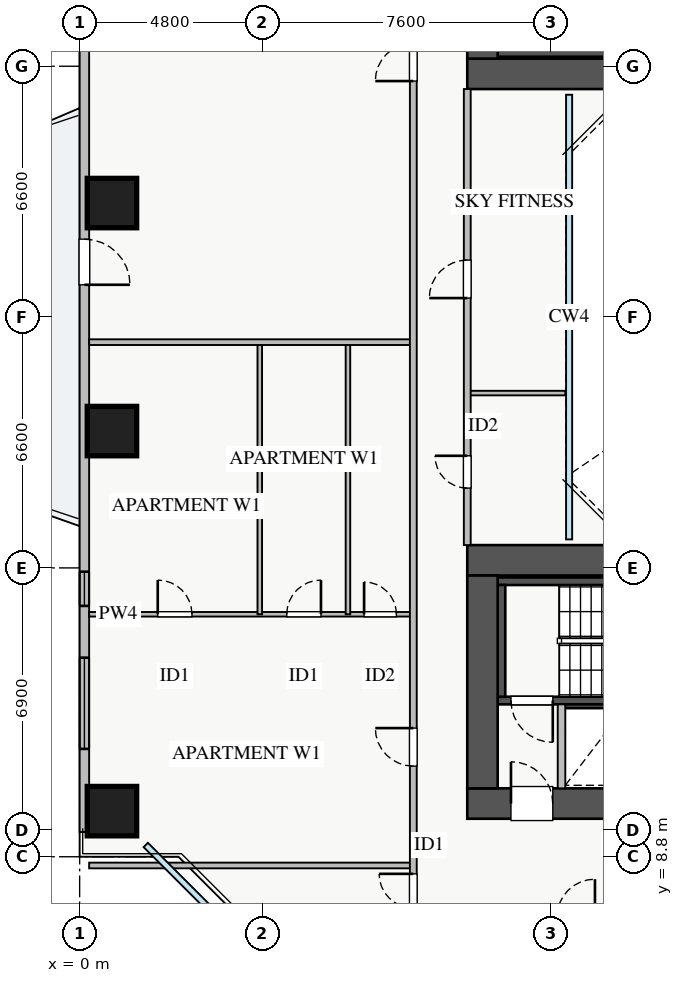
"""IFC4 building model, lengths in metres.
Left out: names, types, materials, properties, quantities, classifications, styles, units other than length and angle.
Written with IfcOpenShell. Run it as: python <this file> out.ifc"""

import sys

from ifc_helpers import new_model, si_unit, direction, frame, frame_2d, origin, origin_2d, place, context, subcontext, project, spatial, rectangle, extrude, source, transform, mapped, element, fill, save


model = new_model("IFC4")
c1 = context("Model", 3, precision=1e-05, world=origin(), true_north=direction((0.0, 1.0)))
c2 = subcontext(c1, "Body", "Model", "MODEL_VIEW")
j1 = project(units=[si_unit("LENGTHUNIT", "METRE"), si_unit("PLANEANGLEUNIT", "RADIAN")], contexts=[c1])
p1 = place(None, origin())
s1 = spatial("IfcSite", under=j1, at=p1, CompositionType="ELEMENT")
p2 = place(p1, origin())
s2 = spatial("IfcBuilding", under=s1, at=p2, CompositionType="ELEMENT")
p3 = place(p2, frame((0.0, 0.0, 29.5)))
s3 = spatial("IfcBuildingStorey", under=s2, at=p3, CompositionType="ELEMENT", Elevation=29.5)
p4 = place(p3, frame((12.68, 12.8, 0.0), z_axis=(0.0, 0.0, 1.0), x_axis=(1.0, 0.0, 0.0)))
e1 = element("IfcWall", 1, at=p4, inside=s3, PredefinedType="SHEAR", context=c2, shape_type="SweptSolid", body=[
    extrude(rectangle(XDim=1.94, YDim=0.18, at=frame_2d((0.97, 0.0))), origin(), (0.0, 0.0, 1.0), 3.07),
])
p5 = place(p3, frame((11.0, 29.95, 0.0), z_axis=(0.0, 0.0, 1.0), x_axis=(1.0, 0.0, 0.0)))
e2 = element("IfcWall", 2, at=p5, inside=s3, PredefinedType="SHEAR", context=c2, shape_type="SweptSolid", body=[
    extrude(rectangle(XDim=7.15, YDim=0.2, at=frame_2d((3.575, 0.0))), origin(), (0.0, 0.0, 1.0), 3.25),
])
p6 = place(p3, frame((11.0, 12.91, 0.0), z_axis=(0.0, 0.0, 1.0), x_axis=(1.0, 0.0, 0.0)))
e3 = element("IfcWall", 3, at=p6, inside=s3, PredefinedType="SHEAR", context=c2, shape_type="SweptSolid", body=[
    extrude(rectangle(XDim=7.15, YDim=0.2, at=frame_2d((3.575, 0.0))), origin(), (0.0, 0.0, 1.0), 3.25),
])
p7 = place(p6, frame((0.35, 0.0, 0.0)))
e4 = element("IfcOpeningElement", 4, at=p7, cuts=e3, PredefinedType="OPENING", context=c2, shape_type="SweptSolid", body=[
    extrude(rectangle(XDim=1.1, YDim=2.05, at=frame_2d((0.55, 1.025))), frame((0.0, 0.11, 0.0), z_axis=(0.0, -1.0, 0.0), x_axis=(1.0, 0.0, 0.0)), (0.0, 0.0, 1.0), 0.22),
])
p8 = place(p3, frame((11.0, 16.05, 0.0), z_axis=(0.0, 0.0, 1.0), x_axis=(1.0, 0.0, 0.0)))
e5 = element("IfcWall", 5, at=p8, inside=s3, PredefinedType="SHEAR", context=c2, shape_type="SweptSolid", body=[
    extrude(rectangle(XDim=7.15, YDim=0.2, at=frame_2d((3.575, 0.0))), origin(), (0.0, 0.0, 1.0), 3.25),
])
p9 = place(p3, frame((11.1, 13.01, 0.0), z_axis=(0.0, 0.0, 1.0), x_axis=(0.0, 1.0, 0.0)))
e6 = element("IfcWall", 6, at=p9, inside=s3, PredefinedType="SHEAR", context=c2, shape_type="SweptSolid", body=[
    extrude(rectangle(XDim=2.94, YDim=0.2, at=frame_2d((1.47, 0.0))), origin(), (0.0, 0.0, 1.0), 3.25),
])
p10 = place(p3, frame((10.2, 29.4, 0.0), z_axis=(0.0, 0.0, 1.0), x_axis=(1.0, 0.0, 0.0)))
e7 = element("IfcWall", 7, at=p10, inside=s3, PredefinedType="SHEAR", context=c2, shape_type="SweptSolid", body=[
    extrude(rectangle(XDim=17.6, YDim=0.8, at=frame_2d((8.8, 0.0))), origin(), (0.0, 0.0, 1.0), 3.25),
])
p11 = place(p3, frame((10.6, 29.8, 0.0), z_axis=(0.0, 0.0, 1.0), x_axis=(0.0, 1.0, 0.0)))
e8 = element("IfcWall", 8, at=p11, inside=s3, PredefinedType="SHEAR", context=c2, shape_type="SweptSolid", body=[
    extrude(rectangle(XDim=5.6, YDim=0.8, at=frame_2d((2.8, 0.0))), origin(), (0.0, 0.0, 1.0), 3.25),
])
p12 = place(p3, frame((10.2, 10.2, 0.0), z_axis=(0.0, 0.0, 1.0), x_axis=(1.0, 0.0, 0.0)))
e9 = element("IfcWall", 9, at=p12, inside=s3, PredefinedType="SHEAR", context=c2, shape_type="SweptSolid", body=[
    extrude(rectangle(XDim=17.6, YDim=0.8, at=frame_2d((8.8, 0.0))), origin(), (0.0, 0.0, 1.0), 3.25),
])
p13 = place(p12, frame((1.15, 0.0, 0.0)))
e10 = element("IfcOpeningElement", 10, at=p13, cuts=e9, PredefinedType="OPENING", context=c2, shape_type="SweptSolid", body=[
    extrude(rectangle(XDim=1.1, YDim=2.05, at=frame_2d((0.55, 1.025))), frame((0.0, 0.41, 0.0), z_axis=(0.0, -1.0, 0.0), x_axis=(1.0, 0.0, 0.0)), (0.0, 0.0, 1.0), 0.82),
])
p14 = place(p12, frame((8.3, 0.0, 0.0)))
e11 = element("IfcOpeningElement", 11, at=p14, cuts=e9, PredefinedType="OPENING", context=c2, shape_type="SweptSolid", body=[
    extrude(rectangle(XDim=1.1, YDim=2.05, at=frame_2d((0.55, 1.025))), frame((0.0, 0.41, 0.0), z_axis=(0.0, -1.0, 0.0), x_axis=(1.0, 0.0, 0.0)), (0.0, 0.0, 1.0), 0.82),
])
p15 = place(p12, frame((10.05, 0.0, 0.0)))
e12 = element("IfcOpeningElement", 12, at=p15, cuts=e9, PredefinedType="OPENING", context=c2, shape_type="SweptSolid", body=[
    extrude(rectangle(XDim=1.1, YDim=2.05, at=frame_2d((0.55, 1.025))), frame((0.0, 0.41, 0.0), z_axis=(0.0, -1.0, 0.0), x_axis=(1.0, 0.0, 0.0)), (0.0, 0.0, 1.0), 0.82),
])
p16 = place(p12, frame((14.74, 0.0, 0.0)))
e13 = element("IfcOpeningElement", 13, at=p16, cuts=e9, PredefinedType="OPENING", context=c2, shape_type="SweptSolid", body=[
    extrude(rectangle(XDim=1.0, YDim=2.05, at=frame_2d((0.5, 1.025))), frame((0.0, 0.41, 0.0), z_axis=(0.0, -1.0, 0.0), x_axis=(1.0, 0.0, 0.0)), (0.0, 0.0, 1.0), 0.82),
])
p17 = place(p12, frame((12.585, 0.0, 0.0)))
e14 = element("IfcOpeningElement", 14, at=p17, cuts=e9, PredefinedType="OPENING", context=c2, shape_type="SweptSolid", body=[
    extrude(rectangle(XDim=1.0, YDim=2.05, at=frame_2d((0.5, 1.025))), frame((0.0, 0.41, 0.0), z_axis=(0.0, -1.0, 0.0), x_axis=(1.0, 0.0, 0.0)), (0.0, 0.0, 1.0), 0.82),
])
p18 = place(p3, frame((10.2, 16.6, 0.0), z_axis=(0.0, 0.0, 1.0), x_axis=(1.0, 0.0, 0.0)))
e15 = element("IfcWall", 15, at=p18, inside=s3, PredefinedType="SHEAR", context=c2, shape_type="SweptSolid", body=[
    extrude(rectangle(XDim=17.6, YDim=0.8, at=frame_2d((8.8, 0.0))), origin(), (0.0, 0.0, 1.0), 3.25),
])
p19 = place(p3, frame((10.6, 10.6, 0.0), z_axis=(0.0, 0.0, 1.0), x_axis=(0.0, 1.0, 0.0)))
e16 = element("IfcWall", 16, at=p19, inside=s3, PredefinedType="SHEAR", context=c2, shape_type="SweptSolid", body=[
    extrude(rectangle(XDim=5.6, YDim=0.8, at=frame_2d((2.8, 0.0))), origin(), (0.0, 0.0, 1.0), 3.25),
])
m1 = source(origin(), c2, "Body", "SweptSolid", [
    extrude(rectangle(XDim=1.3, YDim=1.3, at=origin_2d()), origin(), (0.0, 0.0, 1.0), 3.25),
])
for number, where, z_axis, x_axis in (
    (17, (0.85, 26.0, 0.0), (0.0, 0.0, 1.0), (1.0, 0.0, 0.0)),
    (18, (0.85, 20.0, 0.0), (0.0, 0.0, 1.0), (1.0, 0.0, 0.0)),
    (19, (0.85, 10.0, 0.0), (0.0, 0.0, 1.0), (1.0, 0.0, 0.0)),
):
    element("IfcColumn", number, at=place(p3, frame(where, z_axis=z_axis, x_axis=x_axis)), inside=s3, PredefinedType="COLUMN", context=c2, shape_type="MappedRepresentation", body=[
        mapped(m1, transform((0.0, 0.0, 0.0), x_axis=(1.0, 0.0, 0.0), y_axis=(0.0, 1.0, 0.0), z_axis=(0.0, 0.0, 1.0), scale=1.0)),
    ])
p20 = place(p3, frame((0.125, 9.45, 0.0), z_axis=(0.0, 0.0, 1.0), x_axis=(0.0, 1.0, 0.0)))
e20 = element("IfcWall", 20, at=p20, inside=s3, PredefinedType="STANDARD", context=c2, shape_type="SweptSolid", body=[
    extrude(rectangle(XDim=27.1, YDim=0.25, at=frame_2d((13.55, 0.0))), origin(), (0.0, 0.0, 1.0), 2.61),
])
p21 = place(p20, frame((14.4, 0.0, 0.0)))
e21 = element("IfcOpeningElement", 21, at=p21, cuts=e20, PredefinedType="OPENING", context=c2, shape_type="SweptSolid", body=[
    extrude(rectangle(XDim=1.2, YDim=2.1, at=frame_2d((0.6, 1.05))), frame((0.0, 0.135, 0.0), z_axis=(0.0, -1.0, 0.0), x_axis=(1.0, 0.0, 0.0)), (0.0, 0.0, 1.0), 0.27),
])
p22 = place(p20, frame((2.188, 0.0, 0.9)))
e22 = element("IfcOpeningElement", 22, at=p22, cuts=e20, PredefinedType="OPENING", context=c2, shape_type="SweptSolid", body=[
    extrude(rectangle(XDim=2.4, YDim=1.48, at=frame_2d((1.2, 0.74))), frame((0.0, 0.135, 0.0), z_axis=(0.0, -1.0, 0.0), x_axis=(1.0, 0.0, 0.0)), (0.0, 0.0, 1.0), 0.27),
])
p23 = place(p20, frame((22.663, 0.0, 0.9)))
e23 = element("IfcOpeningElement", 23, at=p23, cuts=e20, PredefinedType="OPENING", context=c2, shape_type="SweptSolid", body=[
    extrude(rectangle(XDim=2.1, YDim=1.48, at=frame_2d((1.05, 0.74))), frame((0.0, 0.135, 0.0), z_axis=(0.0, -1.0, 0.0), x_axis=(1.0, 0.0, 0.0)), (0.0, 0.0, 1.0), 0.27),
])
p24 = place(p20, frame((5.95, 0.0, 0.9)))
e24 = element("IfcOpeningElement", 24, at=p24, cuts=e20, PredefinedType="OPENING", context=c2, shape_type="SweptSolid", body=[
    extrude(rectangle(XDim=0.9, YDim=1.2, at=frame_2d((0.45, 0.6))), frame((0.0, 0.135, 0.0), z_axis=(0.0, -1.0, 0.0), x_axis=(1.0, 0.0, 0.0)), (0.0, 0.0, 1.0), 0.27),
])
p25 = place(p3, frame((12.68, 10.6, 0.0), z_axis=(0.0, 0.0, 1.0), x_axis=(0.0, 1.0, 0.0)))
e25 = element("IfcWall", 25, at=p25, inside=s3, PredefinedType="PARTITIONING", context=c2, shape_type="SweptSolid", body=[
    extrude(rectangle(XDim=2.21, YDim=0.2, at=frame_2d((1.105, 0.0))), origin(), (0.0, 0.0, 1.0), 3.07),
])
p26 = place(p3, frame((0.25, 8.57, 0.0), z_axis=(0.0, 0.0, 1.0), x_axis=(1.0, 0.0, 0.0)))
e26 = element("IfcWall", 26, at=p26, inside=s3, PredefinedType="PARTITIONING", context=c2, shape_type="SweptSolid", body=[
    extrude(rectangle(XDim=8.53, YDim=0.15, at=frame_2d((4.265, 0.0))), origin(), (0.0, 0.0, 1.0), 3.07),
])
p27 = place(p3, frame((0.25, 15.18, 0.0), z_axis=(0.0, 0.0, 1.0), x_axis=(1.0, 0.0, 0.0)))
e27 = element("IfcWall", 27, at=p27, inside=s3, PredefinedType="PLUMBINGWALL", context=c2, shape_type="SweptSolid", body=[
    extrude(rectangle(XDim=8.53, YDim=0.12, at=frame_2d((4.265, 0.0))), origin(), (0.0, 0.0, 1.0), 3.07),
])
p28 = place(p27, frame((1.805, 0.0, 0.0)))
e28 = element("IfcOpeningElement", 28, at=p28, cuts=e27, PredefinedType="OPENING", context=c2, shape_type="SweptSolid", body=[
    extrude(rectangle(XDim=0.9, YDim=2.05, at=frame_2d((0.45, 1.025))), frame((0.0, 0.07, 0.0), z_axis=(0.0, -1.0, 0.0), x_axis=(1.0, 0.0, 0.0)), (0.0, 0.0, 1.0), 0.14),
])
p29 = place(p27, frame((5.2, 0.0, 0.0)))
e29 = element("IfcOpeningElement", 29, at=p29, cuts=e27, PredefinedType="OPENING", context=c2, shape_type="SweptSolid", body=[
    extrude(rectangle(XDim=0.9, YDim=2.05, at=frame_2d((0.45, 1.025))), frame((0.0, 0.07, 0.0), z_axis=(0.0, -1.0, 0.0), x_axis=(1.0, 0.0, 0.0)), (0.0, 0.0, 1.0), 0.14),
])
p30 = place(p27, frame((7.235, 0.0, 0.0)))
e30 = element("IfcOpeningElement", 30, at=p30, cuts=e27, PredefinedType="OPENING", context=c2, shape_type="SweptSolid", body=[
    extrude(rectangle(XDim=0.85, YDim=2.05, at=frame_2d((0.425, 1.025))), frame((0.0, 0.07, 0.0), z_axis=(0.0, -1.0, 0.0), x_axis=(1.0, 0.0, 0.0)), (0.0, 0.0, 1.0), 0.14),
])
for number, where, z_axis, x_axis in (
    (31, (4.74, 15.18, 0.0), (0.0, 0.0, 1.0), (0.0, 1.0, 0.0)),
    (32, (7.06, 15.18, 0.0), (0.0, 0.0, 1.0), (0.0, 1.0, 0.0)),
):
    element("IfcWall", number, at=place(p3, frame(where, z_axis=z_axis, x_axis=x_axis)), inside=s3, PredefinedType="PLUMBINGWALL", context=c2, shape_type="SweptSolid", body=[
        extrude(rectangle(XDim=7.16, YDim=0.12, at=frame_2d((3.58, 0.0))), origin(), (0.0, 0.0, 1.0), 3.07),
    ])
p31 = place(p3, frame((0.25, 22.34, 0.0), z_axis=(0.0, 0.0, 1.0), x_axis=(1.0, 0.0, 0.0)))
e33 = element("IfcWall", 33, at=p31, inside=s3, PredefinedType="PARTITIONING", context=c2, shape_type="SweptSolid", body=[
    extrude(rectangle(XDim=8.53, YDim=0.15, at=frame_2d((4.265, 0.0))), origin(), (0.0, 0.0, 1.0), 3.07),
])
p32 = place(p3, frame((8.78, 7.21, 0.0), z_axis=(0.0, 0.0, 1.0), x_axis=(0.0, 1.0, 0.0)))
e34 = element("IfcWall", 34, at=p32, inside=s3, PredefinedType="PARTITIONING", context=c2, shape_type="SweptSolid", body=[
    extrude(rectangle(XDim=31.23, YDim=0.18, at=frame_2d((15.615, 0.0))), origin(), (0.0, 0.0, 1.0), 3.07),
])
p33 = place(p32, frame((30.09, 0.0, 0.0)))
e35 = element("IfcOpeningElement", 35, at=p33, cuts=e34, PredefinedType="OPENING", context=c2, shape_type="SweptSolid", body=[
    extrude(rectangle(XDim=0.9, YDim=2.05, at=frame_2d((0.45, 1.025))), frame((0.0, 0.1, 0.0), z_axis=(0.0, -1.0, 0.0), x_axis=(1.0, 0.0, 0.0)), (0.0, 0.0, 1.0), 0.2),
])
p34 = place(p32, frame((0.24, 0.0, 0.0)))
e36 = element("IfcOpeningElement", 36, at=p34, cuts=e34, PredefinedType="OPENING", context=c2, shape_type="SweptSolid", body=[
    extrude(rectangle(XDim=0.9, YDim=2.05, at=frame_2d((0.45, 1.025))), frame((0.0, 0.1, 0.0), z_axis=(0.0, -1.0, 0.0), x_axis=(1.0, 0.0, 0.0)), (0.0, 0.0, 1.0), 0.2),
])
p35 = place(p32, frame((3.975, 0.0, 0.0)))
e37 = element("IfcOpeningElement", 37, at=p35, cuts=e34, PredefinedType="OPENING", context=c2, shape_type="SweptSolid", body=[
    extrude(rectangle(XDim=1.0, YDim=2.05, at=frame_2d((0.5, 1.025))), frame((0.0, 0.1, 0.0), z_axis=(0.0, -1.0, 0.0), x_axis=(1.0, 0.0, 0.0)), (0.0, 0.0, 1.0), 0.2),
])
p36 = place(p32, frame((22.0, 0.0, 0.0)))
e38 = element("IfcOpeningElement", 38, at=p36, cuts=e34, PredefinedType="OPENING", context=c2, shape_type="SweptSolid", body=[
    extrude(rectangle(XDim=1.0, YDim=2.05, at=frame_2d((0.5, 1.025))), frame((0.0, 0.1, 0.0), z_axis=(0.0, -1.0, 0.0), x_axis=(1.0, 0.0, 0.0)), (0.0, 0.0, 1.0), 0.2),
])
p37 = place(p3, frame((10.2, 21.0, 0.0), z_axis=(0.0, 0.0, 1.0), x_axis=(1.0, 0.0, 0.0)))
e39 = element("IfcWall", 39, at=p37, inside=s3, PredefinedType="PLUMBINGWALL", context=c2, shape_type="SweptSolid", body=[
    extrude(rectangle(XDim=2.58, YDim=0.12, at=frame_2d((1.29, 0.0))), origin(), (0.0, 0.0, 1.0), 3.07),
])
p38 = place(p3, frame((10.2, 17.0, 0.0), z_axis=(0.0, 0.0, 1.0), x_axis=(0.0, 1.0, 0.0)))
e40 = element("IfcWall", 40, at=p38, inside=s3, PredefinedType="PARTITIONING", context=c2, shape_type="SweptSolid", body=[
    extrude(rectangle(XDim=12.0, YDim=0.18, at=frame_2d((6.0, 0.0))), origin(), (0.0, 0.0, 1.0), 3.07),
])
p39 = place(p38, frame((1.5, 0.0, 0.0)))
e41 = element("IfcOpeningElement", 41, at=p39, cuts=e40, PredefinedType="OPENING", context=c2, shape_type="SweptSolid", body=[
    extrude(rectangle(XDim=0.85, YDim=2.05, at=frame_2d((0.425, 1.025))), frame((0.0, 0.1, 0.0), z_axis=(0.0, -1.0, 0.0), x_axis=(1.0, 0.0, 0.0)), (0.0, 0.0, 1.0), 0.2),
])
p40 = place(p38, frame((6.5, 0.0, 0.0)))
e42 = element("IfcOpeningElement", 42, at=p40, cuts=e40, PredefinedType="OPENING", context=c2, shape_type="SweptSolid", body=[
    extrude(rectangle(XDim=1.0, YDim=2.05, at=frame_2d((0.5, 1.025))), frame((0.0, 0.1, 0.0), z_axis=(0.0, -1.0, 0.0), x_axis=(1.0, 0.0, 0.0)), (0.0, 0.0, 1.0), 0.2),
])
m2 = source(origin(), c2, "Body", "SweptSolid", [
    extrude(rectangle(XDim=1.2, YDim=2.1, at=frame_2d((0.6, 1.05))), frame((0.0, 0.025, 0.0), z_axis=(0.0, -1.0, 0.0), x_axis=(1.0, 0.0, 0.0)), (0.0, 0.0, 1.0), 0.05),
])
p41 = place(p21, frame((1.2, 0.0, 0.0), z_axis=(0.0, 0.0, 1.0), x_axis=(-1.0, 0.0, 0.0)))
e43 = element("IfcDoor", 43, at=p41, inside=s3, OperationType="SINGLE_SWING_LEFT", PredefinedType="DOOR", context=c2, shape_type="MappedRepresentation", body=[
    mapped(m2, transform((0.0, 0.0, 0.0), x_axis=(1.0, 0.0, 0.0), y_axis=(0.0, 1.0, 0.0), z_axis=(0.0, 0.0, 1.0), scale=1.0)),
])
fill(e21, e43)
m3 = source(origin(), c2, "Body", "SweptSolid", [
    extrude(rectangle(XDim=2.4, YDim=1.48, at=frame_2d((1.2, 0.74))), frame((0.0, 0.03, 0.0), z_axis=(0.0, -1.0, 0.0), x_axis=(1.0, 0.0, 0.0)), (0.0, 0.0, 1.0), 0.06),
])
p42 = place(p22, origin())
e44 = element("IfcWindow", 44, at=p42, inside=s3, PartitioningType="TRIPLE_PANEL_VERTICAL", PredefinedType="WINDOW", context=c2, shape_type="MappedRepresentation", body=[
    mapped(m3, transform((0.0, 0.0, 0.0), x_axis=(1.0, 0.0, 0.0), y_axis=(0.0, 1.0, 0.0), z_axis=(0.0, 0.0, 1.0), scale=1.0)),
])
fill(e22, e44)
m4 = source(origin(), c2, "Body", "SweptSolid", [
    extrude(rectangle(XDim=1.1, YDim=2.05, at=frame_2d((0.55, 1.025))), frame((0.0, 0.025, 0.0), z_axis=(0.0, -1.0, 0.0), x_axis=(1.0, 0.0, 0.0)), (0.0, 0.0, 1.0), 0.05),
])
p43 = place(p13, origin())
e45 = element("IfcDoor", 45, at=p43, inside=s3, OperationType="SINGLE_SWING_LEFT", PredefinedType="DOOR", context=c2, shape_type="MappedRepresentation", body=[
    mapped(m4, transform((0.0, 0.0, 0.0), x_axis=(1.0, 0.0, 0.0), y_axis=(0.0, 1.0, 0.0), z_axis=(0.0, 0.0, 1.0), scale=1.0)),
])
fill(e10, e45)
p44 = place(p7, frame((1.1, 0.0, 0.0), z_axis=(0.0, 0.0, 1.0), x_axis=(-1.0, 0.0, 0.0)))
e46 = element("IfcDoor", 46, at=p44, inside=s3, OperationType="SINGLE_SWING_RIGHT", PredefinedType="DOOR", context=c2, shape_type="MappedRepresentation", body=[
    mapped(m4, transform((0.0, 0.0, 0.0), x_axis=(1.0, 0.0, 0.0), y_axis=(0.0, 1.0, 0.0), z_axis=(0.0, 0.0, 1.0), scale=1.0)),
])
fill(e4, e46)
m5 = source(origin(), c2, "Body", "SweptSolid", [
    extrude(rectangle(XDim=0.9, YDim=2.05, at=frame_2d((0.45, 1.025))), frame((0.0, 0.025, 0.0), z_axis=(0.0, -1.0, 0.0), x_axis=(1.0, 0.0, 0.0)), (0.0, 0.0, 1.0), 0.05),
])
p45 = place(p28, origin())
e47 = element("IfcDoor", 47, at=p45, inside=s3, OperationType="SINGLE_SWING_LEFT", PredefinedType="DOOR", context=c2, shape_type="MappedRepresentation", body=[
    mapped(m5, transform((0.0, 0.0, 0.0), x_axis=(1.0, 0.0, 0.0), y_axis=(0.0, 1.0, 0.0), z_axis=(0.0, 0.0, 1.0), scale=1.0)),
])
fill(e28, e47)
p46 = place(p29, origin())
e48 = element("IfcDoor", 48, at=p46, inside=s3, OperationType="SINGLE_SWING_RIGHT", PredefinedType="DOOR", context=c2, shape_type="MappedRepresentation", body=[
    mapped(m5, transform((0.0, 0.0, 0.0), x_axis=(1.0, 0.0, 0.0), y_axis=(0.0, 1.0, 0.0), z_axis=(0.0, 0.0, 1.0), scale=1.0)),
])
fill(e29, e48)
m6 = source(origin(), c2, "Body", "SweptSolid", [
    extrude(rectangle(XDim=0.85, YDim=2.05, at=frame_2d((0.425, 1.025))), frame((0.0, 0.025, 0.0), z_axis=(0.0, -1.0, 0.0), x_axis=(1.0, 0.0, 0.0)), (0.0, 0.0, 1.0), 0.05),
])
p47 = place(p30, origin())
e49 = element("IfcDoor", 49, at=p47, inside=s3, OperationType="SINGLE_SWING_LEFT", PredefinedType="DOOR", context=c2, shape_type="MappedRepresentation", body=[
    mapped(m6, transform((0.0, 0.0, 0.0), x_axis=(1.0, 0.0, 0.0), y_axis=(0.0, 1.0, 0.0), z_axis=(0.0, 0.0, 1.0), scale=1.0)),
])
fill(e30, e49)
p48 = place(p34, origin())
e50 = element("IfcDoor", 50, at=p48, inside=s3, OperationType="SINGLE_SWING_RIGHT", PredefinedType="DOOR", context=c2, shape_type="MappedRepresentation", body=[
    mapped(m5, transform((0.0, 0.0, 0.0), x_axis=(1.0, 0.0, 0.0), y_axis=(0.0, 1.0, 0.0), z_axis=(0.0, 0.0, 1.0), scale=1.0)),
])
fill(e36, e50)
m7 = source(origin(), c2, "Body", "SweptSolid", [
    extrude(rectangle(XDim=1.0, YDim=2.05, at=frame_2d((0.5, 1.025))), frame((0.0, 0.025, 0.0), z_axis=(0.0, -1.0, 0.0), x_axis=(1.0, 0.0, 0.0)), (0.0, 0.0, 1.0), 0.05),
])
p49 = place(p35, origin())
e51 = element("IfcDoor", 51, at=p49, inside=s3, OperationType="SINGLE_SWING_RIGHT", PredefinedType="DOOR", context=c2, shape_type="MappedRepresentation", body=[
    mapped(m7, transform((0.0, 0.0, 0.0), x_axis=(1.0, 0.0, 0.0), y_axis=(0.0, 1.0, 0.0), z_axis=(0.0, 0.0, 1.0), scale=1.0)),
])
fill(e37, e51)
p50 = place(p36, origin())
e52 = element("IfcDoor", 52, at=p50, inside=s3, OperationType="SINGLE_SWING_LEFT", PredefinedType="DOOR", context=c2, shape_type="MappedRepresentation", body=[
    mapped(m7, transform((0.0, 0.0, 0.0), x_axis=(1.0, 0.0, 0.0), y_axis=(0.0, 1.0, 0.0), z_axis=(0.0, 0.0, 1.0), scale=1.0)),
])
fill(e38, e52)
p51 = place(p39, origin())
e53 = element("IfcDoor", 53, at=p51, inside=s3, OperationType="SINGLE_SWING_RIGHT", PredefinedType="DOOR", context=c2, shape_type="MappedRepresentation", body=[
    mapped(m6, transform((0.0, 0.0, 0.0), x_axis=(1.0, 0.0, 0.0), y_axis=(0.0, 1.0, 0.0), z_axis=(0.0, 0.0, 1.0), scale=1.0)),
])
fill(e41, e53)
p52 = place(p40, origin())
e54 = element("IfcDoor", 54, at=p52, inside=s3, OperationType="SINGLE_SWING_LEFT", PredefinedType="DOOR", context=c2, shape_type="MappedRepresentation", body=[
    mapped(m7, transform((0.0, 0.0, 0.0), x_axis=(1.0, 0.0, 0.0), y_axis=(0.0, 1.0, 0.0), z_axis=(0.0, 0.0, 1.0), scale=1.0)),
])
fill(e42, e54)
m8 = source(origin(), c2, "Body", "SweptSolid", [
    extrude(rectangle(XDim=0.9, YDim=1.2, at=frame_2d((0.45, 0.6))), frame((0.0, 0.03, 0.0), z_axis=(0.0, -1.0, 0.0), x_axis=(1.0, 0.0, 0.0)), (0.0, 0.0, 1.0), 0.06),
])
p53 = place(p24, origin())
e55 = element("IfcWindow", 55, at=p53, inside=s3, PartitioningType="SINGLE_PANEL", PredefinedType="WINDOW", context=c2, shape_type="MappedRepresentation", body=[
    mapped(m8, transform((0.0, 0.0, 0.0), x_axis=(1.0, 0.0, 0.0), y_axis=(0.0, 1.0, 0.0), z_axis=(0.0, 0.0, 1.0), scale=1.0)),
])
fill(e24, e55)
save(model, sys.argv[1])
